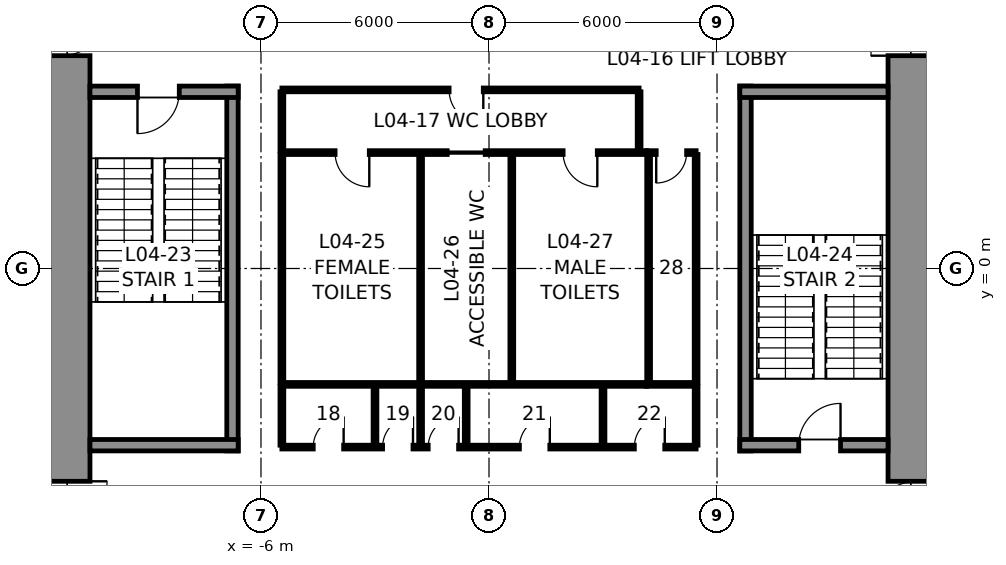
"""IFC4 building model, lengths in metres.
Left out: names, types, materials, properties, quantities, classifications, styles, units other than length and angle.
Written with IfcOpenShell. Run it as: python <this file> out.ifc"""

import sys

from ifc_helpers import new_model, si_unit, direction, frame, frame_2d, origin, place, context, subcontext, project, spatial, rectangle, extrude, element, fill, save


model = new_model("IFC4")
c1 = context("Model", 3, precision=1e-05, world=origin(), true_north=direction((0.0, 1.0)))
c2 = subcontext(c1, "Body", "Model", "MODEL_VIEW")
j1 = project(units=[si_unit("LENGTHUNIT", "METRE"), si_unit("PLANEANGLEUNIT", "RADIAN")], contexts=[c1])
p1 = place(None, origin())
s1 = spatial("IfcSite", under=j1, at=p1, CompositionType="ELEMENT")
p2 = place(p1, origin())
s2 = spatial("IfcBuilding", under=s1, at=p2, CompositionType="ELEMENT")
p3 = place(p2, frame((0.0, 0.0, 21.0)))
s3 = spatial("IfcBuildingStorey", under=s2, at=p3, CompositionType="ELEMENT", Elevation=21.0)
p4 = place(p3, frame((11.25, 10.5, 0.0), z_axis=(0.0, 0.0, 1.0), x_axis=(0.0, -1.0, 0.0)))
e1 = element("IfcWall", 1, at=p4, inside=s3, PredefinedType="SHEAR", context=c2, shape_type="SweptSolid", body=[
    extrude(rectangle(XDim=21.0, YDim=1.5, at=frame_2d((10.5, 0.0))), origin(), (0.0, 0.0, 1.0), 5.5),
])
p5 = place(p4, frame((3.7, 0.0, 0.0)))
e2 = element("IfcOpeningElement", 2, at=p5, cuts=e1, PredefinedType="OPENING", context=c2, shape_type="SweptSolid", body=[
    extrude(rectangle(XDim=1.2, YDim=2.3, at=frame_2d((0.6, 1.15))), frame((0.0, 0.76, 0.0), z_axis=(0.0, -1.0, 0.0), x_axis=(1.0, 0.0, 0.0)), (0.0, 0.0, 1.0), 1.52),
])
p6 = place(p4, frame((16.1, 0.0, 0.0)))
e3 = element("IfcOpeningElement", 3, at=p6, cuts=e1, PredefinedType="OPENING", context=c2, shape_type="SweptSolid", body=[
    extrude(rectangle(XDim=1.2, YDim=2.3, at=frame_2d((0.6, 1.15))), frame((0.0, 0.76, 0.0), z_axis=(0.0, -1.0, 0.0), x_axis=(1.0, 0.0, 0.0)), (0.0, 0.0, 1.0), 1.52),
])
p7 = place(p3, frame((-11.25, -10.5, 0.0), z_axis=(0.0, 0.0, 1.0), x_axis=(0.0, 1.0, 0.0)))
e4 = element("IfcWall", 4, at=p7, inside=s3, PredefinedType="SHEAR", context=c2, shape_type="SweptSolid", body=[
    extrude(rectangle(XDim=21.0, YDim=1.5, at=frame_2d((10.5, 0.0))), origin(), (0.0, 0.0, 1.0), 5.5),
])
p8 = place(p7, frame((16.1, 0.0, 0.0)))
e5 = element("IfcOpeningElement", 5, at=p8, cuts=e4, PredefinedType="OPENING", context=c2, shape_type="SweptSolid", body=[
    extrude(rectangle(XDim=1.2, YDim=2.3, at=frame_2d((0.6, 1.15))), frame((0.0, 0.76, 0.0), z_axis=(0.0, -1.0, 0.0), x_axis=(1.0, 0.0, 0.0)), (0.0, 0.0, 1.0), 1.52),
])
p9 = place(p7, frame((3.7, 0.0, 0.0)))
e6 = element("IfcOpeningElement", 6, at=p9, cuts=e4, PredefinedType="OPENING", context=c2, shape_type="SweptSolid", body=[
    extrude(rectangle(XDim=1.2, YDim=2.3, at=frame_2d((0.6, 1.15))), frame((0.0, 0.76, 0.0), z_axis=(0.0, -1.0, 0.0), x_axis=(1.0, 0.0, 0.0)), (0.0, 0.0, 1.0), 1.52),
])
p10 = place(p3, frame((-6.75, -4.8, 0.0), z_axis=(0.0, 0.0, 1.0), x_axis=(0.0, 1.0, 0.0)))
e7 = element("IfcWall", 7, at=p10, inside=s3, PredefinedType="SOLIDWALL", context=c2, shape_type="SweptSolid", body=[
    extrude(rectangle(XDim=9.6, YDim=0.3, at=frame_2d((4.8, 0.0))), origin(), (0.0, 0.0, 1.0), 5.25),
])
p11 = place(p3, frame((-10.5, 4.65, 0.0), z_axis=(0.0, 0.0, 1.0), x_axis=(1.0, 0.0, 0.0)))
e8 = element("IfcWall", 8, at=p11, inside=s3, PredefinedType="SOLIDWALL", context=c2, shape_type="SweptSolid", body=[
    extrude(rectangle(XDim=3.9, YDim=0.3, at=frame_2d((1.95, 0.0))), origin(), (0.0, 0.0, 1.0), 5.25),
])
p12 = place(p11, frame((1.25, 0.0, 0.0)))
e9 = element("IfcOpeningElement", 9, at=p12, cuts=e8, PredefinedType="OPENING", context=c2, shape_type="SweptSolid", body=[
    extrude(rectangle(XDim=1.1, YDim=2.3, at=frame_2d((0.55, 1.15))), frame((0.0, 0.16, 0.0), z_axis=(0.0, -1.0, 0.0), x_axis=(1.0, 0.0, 0.0)), (0.0, 0.0, 1.0), 0.32),
])
p13 = place(p3, frame((-6.6, -4.65, 0.0), z_axis=(0.0, 0.0, 1.0), x_axis=(-1.0, 0.0, 0.0)))
e10 = element("IfcWall", 10, at=p13, inside=s3, PredefinedType="SOLIDWALL", context=c2, shape_type="SweptSolid", body=[
    extrude(rectangle(XDim=3.9, YDim=0.3, at=frame_2d((1.95, 0.0))), origin(), (0.0, 0.0, 1.0), 5.25),
])
p14 = place(p3, frame((6.75, -4.8, 0.0), z_axis=(0.0, 0.0, 1.0), x_axis=(0.0, 1.0, 0.0)))
e11 = element("IfcWall", 11, at=p14, inside=s3, PredefinedType="SOLIDWALL", context=c2, shape_type="SweptSolid", body=[
    extrude(rectangle(XDim=9.6, YDim=0.3, at=frame_2d((4.8, 0.0))), origin(), (0.0, 0.0, 1.0), 5.25),
])
p15 = place(p3, frame((6.6, 4.65, 0.0), z_axis=(0.0, 0.0, 1.0), x_axis=(1.0, 0.0, 0.0)))
e12 = element("IfcWall", 12, at=p15, inside=s3, PredefinedType="SOLIDWALL", context=c2, shape_type="SweptSolid", body=[
    extrude(rectangle(XDim=3.9, YDim=0.3, at=frame_2d((1.95, 0.0))), origin(), (0.0, 0.0, 1.0), 5.25),
])
p16 = place(p3, frame((10.5, -4.65, 0.0), z_axis=(0.0, 0.0, 1.0), x_axis=(-1.0, 0.0, 0.0)))
e13 = element("IfcWall", 13, at=p16, inside=s3, PredefinedType="SOLIDWALL", context=c2, shape_type="SweptSolid", body=[
    extrude(rectangle(XDim=3.9, YDim=0.3, at=frame_2d((1.95, 0.0))), origin(), (0.0, 0.0, 1.0), 5.25),
])
p17 = place(p16, frame((1.25, 0.0, 0.0)))
e14 = element("IfcOpeningElement", 14, at=p17, cuts=e13, PredefinedType="OPENING", context=c2, shape_type="SweptSolid", body=[
    extrude(rectangle(XDim=1.1, YDim=2.3, at=frame_2d((0.55, 1.15))), frame((0.0, 0.16, 0.0), z_axis=(0.0, -1.0, 0.0), x_axis=(1.0, 0.0, 0.0)), (0.0, 0.0, 1.0), 0.32),
])
p18 = place(p3, frame((-5.45, 3.05, 0.0), z_axis=(0.0, 0.0, 1.0), x_axis=(1.0, 0.0, 0.0)))
e15 = element("IfcWall", 15, at=p18, inside=s3, PredefinedType="PARTITIONING", context=c2, shape_type="SweptSolid", body=[
    extrude(rectangle(XDim=9.6, YDim=0.1, at=frame_2d((4.8, 0.0))), origin(), (0.0, 0.0, 1.0), 5.25),
])
p19 = place(p18, frame((1.4, 0.0, 0.0)))
e16 = element("IfcOpeningElement", 16, at=p19, cuts=e15, PredefinedType="OPENING", context=c2, shape_type="SweptSolid", body=[
    extrude(rectangle(XDim=0.9, YDim=2.3, at=frame_2d((0.45, 1.15))), frame((0.0, 0.06, 0.0), z_axis=(0.0, -1.0, 0.0), x_axis=(1.0, 0.0, 0.0)), (0.0, 0.0, 1.0), 0.12),
])
p20 = place(p18, frame((4.35, 0.0, 0.0)))
e17 = element("IfcOpeningElement", 17, at=p20, cuts=e15, PredefinedType="OPENING", context=c2, shape_type="SweptSolid", body=[
    extrude(rectangle(XDim=1.0, YDim=2.3, at=frame_2d((0.5, 1.15))), frame((0.0, 0.06, 0.0), z_axis=(0.0, -1.0, 0.0), x_axis=(1.0, 0.0, 0.0)), (0.0, 0.0, 1.0), 0.12),
])
p21 = place(p18, frame((7.4, 0.0, 0.0)))
e18 = element("IfcOpeningElement", 18, at=p21, cuts=e15, PredefinedType="OPENING", context=c2, shape_type="SweptSolid", body=[
    extrude(rectangle(XDim=0.9, YDim=2.3, at=frame_2d((0.45, 1.15))), frame((0.0, 0.06, 0.0), z_axis=(0.0, -1.0, 0.0), x_axis=(1.0, 0.0, 0.0)), (0.0, 0.0, 1.0), 0.12),
])
p22 = place(p3, frame((4.15, 3.05, 0.0), z_axis=(0.0, 0.0, 1.0), x_axis=(1.0, 0.0, 0.0)))
e19 = element("IfcWall", 19, at=p22, inside=s3, PredefinedType="PARTITIONING", context=c2, shape_type="SweptSolid", body=[
    extrude(rectangle(XDim=1.3, YDim=0.1, at=frame_2d((0.65, 0.0))), origin(), (0.0, 0.0, 1.0), 5.25),
])
p23 = place(p22, frame((0.25, 0.0, 0.0)))
e20 = element("IfcOpeningElement", 20, at=p23, cuts=e19, PredefinedType="OPENING", context=c2, shape_type="SweptSolid", body=[
    extrude(rectangle(XDim=0.8, YDim=2.3, at=frame_2d((0.4, 1.15))), frame((0.0, 0.06, 0.0), z_axis=(0.0, -1.0, 0.0), x_axis=(1.0, 0.0, 0.0)), (0.0, 0.0, 1.0), 0.12),
])
p24 = place(p3, frame((4.15, -3.05, 0.0), z_axis=(0.0, 0.0, 1.0), x_axis=(-1.0, 0.0, 0.0)))
e21 = element("IfcWall", 21, at=p24, inside=s3, PredefinedType="PARTITIONING", context=c2, shape_type="SweptSolid", body=[
    extrude(rectangle(XDim=9.6, YDim=0.1, at=frame_2d((4.8, 0.0))), origin(), (0.0, 0.0, 1.0), 5.25),
])
p25 = place(p3, frame((5.45, -3.05, 0.0), z_axis=(0.0, 0.0, 1.0), x_axis=(-1.0, 0.0, 0.0)))
e22 = element("IfcWall", 22, at=p25, inside=s3, PredefinedType="PARTITIONING", context=c2, shape_type="SweptSolid", body=[
    extrude(rectangle(XDim=1.3, YDim=0.1, at=frame_2d((0.65, 0.0))), origin(), (0.0, 0.0, 1.0), 5.25),
])
for number, where, z_axis, x_axis in (
    (23, (5.45, 3.0, 0.0), (0.0, 0.0, 1.0), (0.0, -1.0, 0.0)),
    (24, (-5.45, -3.0, 0.0), (0.0, 0.0, 1.0), (0.0, 1.0, 0.0)),
    (25, (-1.8, -3.0, 0.0), (0.0, 0.0, 1.0), (0.0, 1.0, 0.0)),
    (26, (0.6, -3.0, 0.0), (0.0, 0.0, 1.0), (0.0, 1.0, 0.0)),
    (27, (4.2, -3.0, 0.0), (0.0, 0.0, 1.0), (0.0, 1.0, 0.0)),
):
    element("IfcWall", number, at=place(p3, frame(where, z_axis=z_axis, x_axis=x_axis)), inside=s3, PredefinedType="PARTITIONING", context=c2, shape_type="SweptSolid", body=[
        extrude(rectangle(XDim=6.0, YDim=0.1, at=frame_2d((3.0, 0.0))), origin(), (0.0, 0.0, 1.0), 5.25),
    ])
p26 = place(p3, frame((-5.45, 4.7, 0.0), z_axis=(0.0, 0.0, 1.0), x_axis=(1.0, 0.0, 0.0)))
e28 = element("IfcWall", 28, at=p26, inside=s3, PredefinedType="PARTITIONING", context=c2, shape_type="SweptSolid", body=[
    extrude(rectangle(XDim=9.4, YDim=0.1, at=frame_2d((4.7, 0.0))), origin(), (0.0, 0.0, 1.0), 5.25),
])
p27 = place(p26, frame((4.4, 0.0, 0.0)))
e29 = element("IfcOpeningElement", 29, at=p27, cuts=e28, PredefinedType="OPENING", context=c2, shape_type="SweptSolid", body=[
    extrude(rectangle(XDim=0.9, YDim=2.3, at=frame_2d((0.45, 1.15))), frame((0.0, 0.06, 0.0), z_axis=(0.0, -1.0, 0.0), x_axis=(1.0, 0.0, 0.0)), (0.0, 0.0, 1.0), 0.12),
])
for number, where, z_axis, x_axis in (
    (30, (-5.45, 3.1, 0.0), (0.0, 0.0, 1.0), (0.0, 1.0, 0.0)),
    (31, (3.95, 3.1, 0.0), (0.0, 0.0, 1.0), (0.0, 1.0, 0.0)),
):
    element("IfcWall", number, at=place(p3, frame(where, z_axis=z_axis, x_axis=x_axis)), inside=s3, PredefinedType="PARTITIONING", context=c2, shape_type="SweptSolid", body=[
        extrude(rectangle(XDim=1.55, YDim=0.1, at=frame_2d((0.775, 0.0))), origin(), (0.0, 0.0, 1.0), 5.25),
    ])
p28 = place(p3, frame((5.45, -4.7, 0.0), z_axis=(0.0, 0.0, 1.0), x_axis=(-1.0, 0.0, 0.0)))
e32 = element("IfcWall", 32, at=p28, inside=s3, PredefinedType="PARTITIONING", context=c2, shape_type="SweptSolid", body=[
    extrude(rectangle(XDim=10.9, YDim=0.1, at=frame_2d((5.45, 0.0))), origin(), (0.0, 0.0, 1.0), 5.25),
])
p29 = place(p28, frame((9.275, 0.0, 0.0)))
e33 = element("IfcOpeningElement", 33, at=p29, cuts=e32, PredefinedType="OPENING", context=c2, shape_type="SweptSolid", body=[
    extrude(rectangle(XDim=0.8, YDim=2.3, at=frame_2d((0.4, 1.15))), frame((0.0, 0.06, 0.0), z_axis=(0.0, -1.0, 0.0), x_axis=(1.0, 0.0, 0.0)), (0.0, 0.0, 1.0), 0.12),
])
p30 = place(p28, frame((7.45, 0.0, 0.0)))
e34 = element("IfcOpeningElement", 34, at=p30, cuts=e32, PredefinedType="OPENING", context=c2, shape_type="SweptSolid", body=[
    extrude(rectangle(XDim=0.8, YDim=2.3, at=frame_2d((0.4, 1.15))), frame((0.0, 0.06, 0.0), z_axis=(0.0, -1.0, 0.0), x_axis=(1.0, 0.0, 0.0)), (0.0, 0.0, 1.0), 0.12),
])
p31 = place(p28, frame((6.25, 0.0, 0.0)))
e35 = element("IfcOpeningElement", 35, at=p31, cuts=e32, PredefinedType="OPENING", context=c2, shape_type="SweptSolid", body=[
    extrude(rectangle(XDim=0.8, YDim=2.3, at=frame_2d((0.4, 1.15))), frame((0.0, 0.06, 0.0), z_axis=(0.0, -1.0, 0.0), x_axis=(1.0, 0.0, 0.0)), (0.0, 0.0, 1.0), 0.12),
])
p32 = place(p28, frame((3.85, 0.0, 0.0)))
e36 = element("IfcOpeningElement", 36, at=p32, cuts=e32, PredefinedType="OPENING", context=c2, shape_type="SweptSolid", body=[
    extrude(rectangle(XDim=0.8, YDim=2.3, at=frame_2d((0.4, 1.15))), frame((0.0, 0.06, 0.0), z_axis=(0.0, -1.0, 0.0), x_axis=(1.0, 0.0, 0.0)), (0.0, 0.0, 1.0), 0.12),
])
p33 = place(p28, frame((0.825, 0.0, 0.0)))
e37 = element("IfcOpeningElement", 37, at=p33, cuts=e32, PredefinedType="OPENING", context=c2, shape_type="SweptSolid", body=[
    extrude(rectangle(XDim=0.8, YDim=2.3, at=frame_2d((0.4, 1.15))), frame((0.0, 0.06, 0.0), z_axis=(0.0, -1.0, 0.0), x_axis=(1.0, 0.0, 0.0)), (0.0, 0.0, 1.0), 0.12),
])
for number, where, z_axis, x_axis in (
    (38, (-5.45, -3.1, 0.0), (0.0, 0.0, 1.0), (0.0, -1.0, 0.0)),
    (39, (5.45, -3.1, 0.0), (0.0, 0.0, 1.0), (0.0, -1.0, 0.0)),
    (40, (-3.0, -3.1, 0.0), (0.0, 0.0, 1.0), (0.0, -1.0, 0.0)),
    (41, (-1.8, -3.1, 0.0), (0.0, 0.0, 1.0), (0.0, -1.0, 0.0)),
    (42, (-0.6, -3.1, 0.0), (0.0, 0.0, 1.0), (0.0, -1.0, 0.0)),
    (43, (3.0, -3.1, 0.0), (0.0, 0.0, 1.0), (0.0, -1.0, 0.0)),
):
    element("IfcWall", number, at=place(p3, frame(where, z_axis=z_axis, x_axis=x_axis)), inside=s3, PredefinedType="PARTITIONING", context=c2, shape_type="SweptSolid", body=[
        extrude(rectangle(XDim=1.55, YDim=0.1, at=frame_2d((0.775, 0.0))), origin(), (0.0, 0.0, 1.0), 5.25),
    ])
p34 = place(p12, frame((1.1, 0.0, 0.0), z_axis=(0.0, 0.0, 1.0), x_axis=(-1.0, 0.0, 0.0)))
e44 = element("IfcDoor", 44, at=p34, inside=s3, OperationType="SINGLE_SWING_RIGHT", PredefinedType="DOOR", context=c2, shape_type="SweptSolid", body=[
    extrude(rectangle(XDim=1.1, YDim=2.3, at=frame_2d((0.55, 1.15))), frame((0.0, 0.025, 0.0), z_axis=(0.0, -1.0, 0.0), x_axis=(1.0, 0.0, 0.0)), (0.0, 0.0, 1.0), 0.05),
])
fill(e9, e44)
p35 = place(p17, frame((1.1, 0.0, 0.0), z_axis=(0.0, 0.0, 1.0), x_axis=(-1.0, 0.0, 0.0)))
e45 = element("IfcDoor", 45, at=p35, inside=s3, OperationType="SINGLE_SWING_RIGHT", PredefinedType="DOOR", context=c2, shape_type="SweptSolid", body=[
    extrude(rectangle(XDim=1.1, YDim=2.3, at=frame_2d((0.55, 1.15))), frame((0.0, 0.025, 0.0), z_axis=(0.0, -1.0, 0.0), x_axis=(1.0, 0.0, 0.0)), (0.0, 0.0, 1.0), 0.05),
])
fill(e14, e45)
p36 = place(p19, frame((0.9, 0.0, 0.0), z_axis=(0.0, 0.0, 1.0), x_axis=(-1.0, 0.0, 0.0)))
e46 = element("IfcDoor", 46, at=p36, inside=s3, OperationType="SINGLE_SWING_LEFT", PredefinedType="DOOR", context=c2, shape_type="SweptSolid", body=[
    extrude(rectangle(XDim=0.9, YDim=2.3, at=frame_2d((0.45, 1.15))), frame((0.0, 0.025, 0.0), z_axis=(0.0, -1.0, 0.0), x_axis=(1.0, 0.0, 0.0)), (0.0, 0.0, 1.0), 0.05),
])
fill(e16, e46)
p37 = place(p20, frame((1.0, 0.0, 0.0), z_axis=(0.0, 0.0, 1.0), x_axis=(-1.0, 0.0, 0.0)))
e47 = element("IfcDoor", 47, at=p37, inside=s3, OperationType="SLIDING_TO_LEFT", PredefinedType="DOOR", context=c2, shape_type="SweptSolid", body=[
    extrude(rectangle(XDim=1.0, YDim=2.3, at=frame_2d((0.5, 1.15))), frame((0.0, 0.025, 0.0), z_axis=(0.0, -1.0, 0.0), x_axis=(1.0, 0.0, 0.0)), (0.0, 0.0, 1.0), 0.05),
])
fill(e17, e47)
p38 = place(p21, frame((0.9, 0.0, 0.0), z_axis=(0.0, 0.0, 1.0), x_axis=(-1.0, 0.0, 0.0)))
e48 = element("IfcDoor", 48, at=p38, inside=s3, OperationType="SINGLE_SWING_LEFT", PredefinedType="DOOR", context=c2, shape_type="SweptSolid", body=[
    extrude(rectangle(XDim=0.9, YDim=2.3, at=frame_2d((0.45, 1.15))), frame((0.0, 0.025, 0.0), z_axis=(0.0, -1.0, 0.0), x_axis=(1.0, 0.0, 0.0)), (0.0, 0.0, 1.0), 0.05),
])
fill(e18, e48)
p39 = place(p23, frame((0.8, 0.0, 0.0), z_axis=(0.0, 0.0, 1.0), x_axis=(-1.0, 0.0, 0.0)))
e49 = element("IfcDoor", 49, at=p39, inside=s3, OperationType="SINGLE_SWING_RIGHT", PredefinedType="DOOR", context=c2, shape_type="SweptSolid", body=[
    extrude(rectangle(XDim=0.8, YDim=2.3, at=frame_2d((0.4, 1.15))), frame((0.0, 0.025, 0.0), z_axis=(0.0, -1.0, 0.0), x_axis=(1.0, 0.0, 0.0)), (0.0, 0.0, 1.0), 0.05),
])
fill(e20, e49)
p40 = place(p27, frame((0.9, 0.0, 0.0), z_axis=(0.0, 0.0, 1.0), x_axis=(-1.0, 0.0, 0.0)))
e50 = element("IfcDoor", 50, at=p40, inside=s3, OperationType="SINGLE_SWING_LEFT", PredefinedType="DOOR", context=c2, shape_type="SweptSolid", body=[
    extrude(rectangle(XDim=0.9, YDim=2.3, at=frame_2d((0.45, 1.15))), frame((0.0, 0.025, 0.0), z_axis=(0.0, -1.0, 0.0), x_axis=(1.0, 0.0, 0.0)), (0.0, 0.0, 1.0), 0.05),
])
fill(e29, e50)
p41 = place(p29, frame((0.8, 0.0, 0.0), z_axis=(0.0, 0.0, 1.0), x_axis=(-1.0, 0.0, 0.0)))
e51 = element("IfcDoor", 51, at=p41, inside=s3, OperationType="SINGLE_SWING_RIGHT", PredefinedType="DOOR", context=c2, shape_type="SweptSolid", body=[
    extrude(rectangle(XDim=0.8, YDim=2.3, at=frame_2d((0.4, 1.15))), frame((0.0, 0.025, 0.0), z_axis=(0.0, -1.0, 0.0), x_axis=(1.0, 0.0, 0.0)), (0.0, 0.0, 1.0), 0.05),
])
fill(e33, e51)
p42 = place(p30, frame((0.8, 0.0, 0.0), z_axis=(0.0, 0.0, 1.0), x_axis=(-1.0, 0.0, 0.0)))
e52 = element("IfcDoor", 52, at=p42, inside=s3, OperationType="SINGLE_SWING_RIGHT", PredefinedType="DOOR", context=c2, shape_type="SweptSolid", body=[
    extrude(rectangle(XDim=0.8, YDim=2.3, at=frame_2d((0.4, 1.15))), frame((0.0, 0.025, 0.0), z_axis=(0.0, -1.0, 0.0), x_axis=(1.0, 0.0, 0.0)), (0.0, 0.0, 1.0), 0.05),
])
fill(e34, e52)
p43 = place(p31, frame((0.8, 0.0, 0.0), z_axis=(0.0, 0.0, 1.0), x_axis=(-1.0, 0.0, 0.0)))
e53 = element("IfcDoor", 53, at=p43, inside=s3, OperationType="SINGLE_SWING_RIGHT", PredefinedType="DOOR", context=c2, shape_type="SweptSolid", body=[
    extrude(rectangle(XDim=0.8, YDim=2.3, at=frame_2d((0.4, 1.15))), frame((0.0, 0.025, 0.0), z_axis=(0.0, -1.0, 0.0), x_axis=(1.0, 0.0, 0.0)), (0.0, 0.0, 1.0), 0.05),
])
fill(e35, e53)
p44 = place(p32, frame((0.8, 0.0, 0.0), z_axis=(0.0, 0.0, 1.0), x_axis=(-1.0, 0.0, 0.0)))
e54 = element("IfcDoor", 54, at=p44, inside=s3, OperationType="SINGLE_SWING_RIGHT", PredefinedType="DOOR", context=c2, shape_type="SweptSolid", body=[
    extrude(rectangle(XDim=0.8, YDim=2.3, at=frame_2d((0.4, 1.15))), frame((0.0, 0.025, 0.0), z_axis=(0.0, -1.0, 0.0), x_axis=(1.0, 0.0, 0.0)), (0.0, 0.0, 1.0), 0.05),
])
fill(e36, e54)
p45 = place(p33, frame((0.8, 0.0, 0.0), z_axis=(0.0, 0.0, 1.0), x_axis=(-1.0, 0.0, 0.0)))
e55 = element("IfcDoor", 55, at=p45, inside=s3, OperationType="SINGLE_SWING_RIGHT", PredefinedType="DOOR", context=c2, shape_type="SweptSolid", body=[
    extrude(rectangle(XDim=0.8, YDim=2.3, at=frame_2d((0.4, 1.15))), frame((0.0, 0.025, 0.0), z_axis=(0.0, -1.0, 0.0), x_axis=(1.0, 0.0, 0.0)), (0.0, 0.0, 1.0), 0.05),
])
fill(e37, e55)
p46 = place(p8, frame((1.2, 0.0, 0.0), z_axis=(0.0, 0.0, 1.0), x_axis=(-1.0, 0.0, 0.0)))
e56 = element("IfcDoor", 56, at=p46, inside=s3, OperationType="SINGLE_SWING_LEFT", PredefinedType="DOOR", context=c2, shape_type="SweptSolid", body=[
    extrude(rectangle(XDim=1.2, YDim=2.3, at=frame_2d((0.6, 1.15))), frame((0.0, 0.025, 0.0), z_axis=(0.0, -1.0, 0.0), x_axis=(1.0, 0.0, 0.0)), (0.0, 0.0, 1.0), 0.05),
])
fill(e5, e56)
p47 = place(p9, frame((1.2, 0.0, 0.0), z_axis=(0.0, 0.0, 1.0), x_axis=(-1.0, 0.0, 0.0)))
e57 = element("IfcDoor", 57, at=p47, inside=s3, OperationType="SINGLE_SWING_LEFT", PredefinedType="DOOR", context=c2, shape_type="SweptSolid", body=[
    extrude(rectangle(XDim=1.2, YDim=2.3, at=frame_2d((0.6, 1.15))), frame((0.0, 0.025, 0.0), z_axis=(0.0, -1.0, 0.0), x_axis=(1.0, 0.0, 0.0)), (0.0, 0.0, 1.0), 0.05),
])
fill(e6, e57)
p48 = place(p5, frame((1.2, 0.0, 0.0), z_axis=(0.0, 0.0, 1.0), x_axis=(-1.0, 0.0, 0.0)))
e58 = element("IfcDoor", 58, at=p48, inside=s3, OperationType="SINGLE_SWING_LEFT", PredefinedType="DOOR", context=c2, shape_type="SweptSolid", body=[
    extrude(rectangle(XDim=1.2, YDim=2.3, at=frame_2d((0.6, 1.15))), frame((0.0, 0.025, 0.0), z_axis=(0.0, -1.0, 0.0), x_axis=(1.0, 0.0, 0.0)), (0.0, 0.0, 1.0), 0.05),
])
fill(e2, e58)
p49 = place(p6, frame((1.2, 0.0, 0.0), z_axis=(0.0, 0.0, 1.0), x_axis=(-1.0, 0.0, 0.0)))
e59 = element("IfcDoor", 59, at=p49, inside=s3, OperationType="SINGLE_SWING_LEFT", PredefinedType="DOOR", context=c2, shape_type="SweptSolid", body=[
    extrude(rectangle(XDim=1.2, YDim=2.3, at=frame_2d((0.6, 1.15))), frame((0.0, 0.025, 0.0), z_axis=(0.0, -1.0, 0.0), x_axis=(1.0, 0.0, 0.0)), (0.0, 0.0, 1.0), 0.05),
])
fill(e3, e59)
save(model, sys.argv[1])
